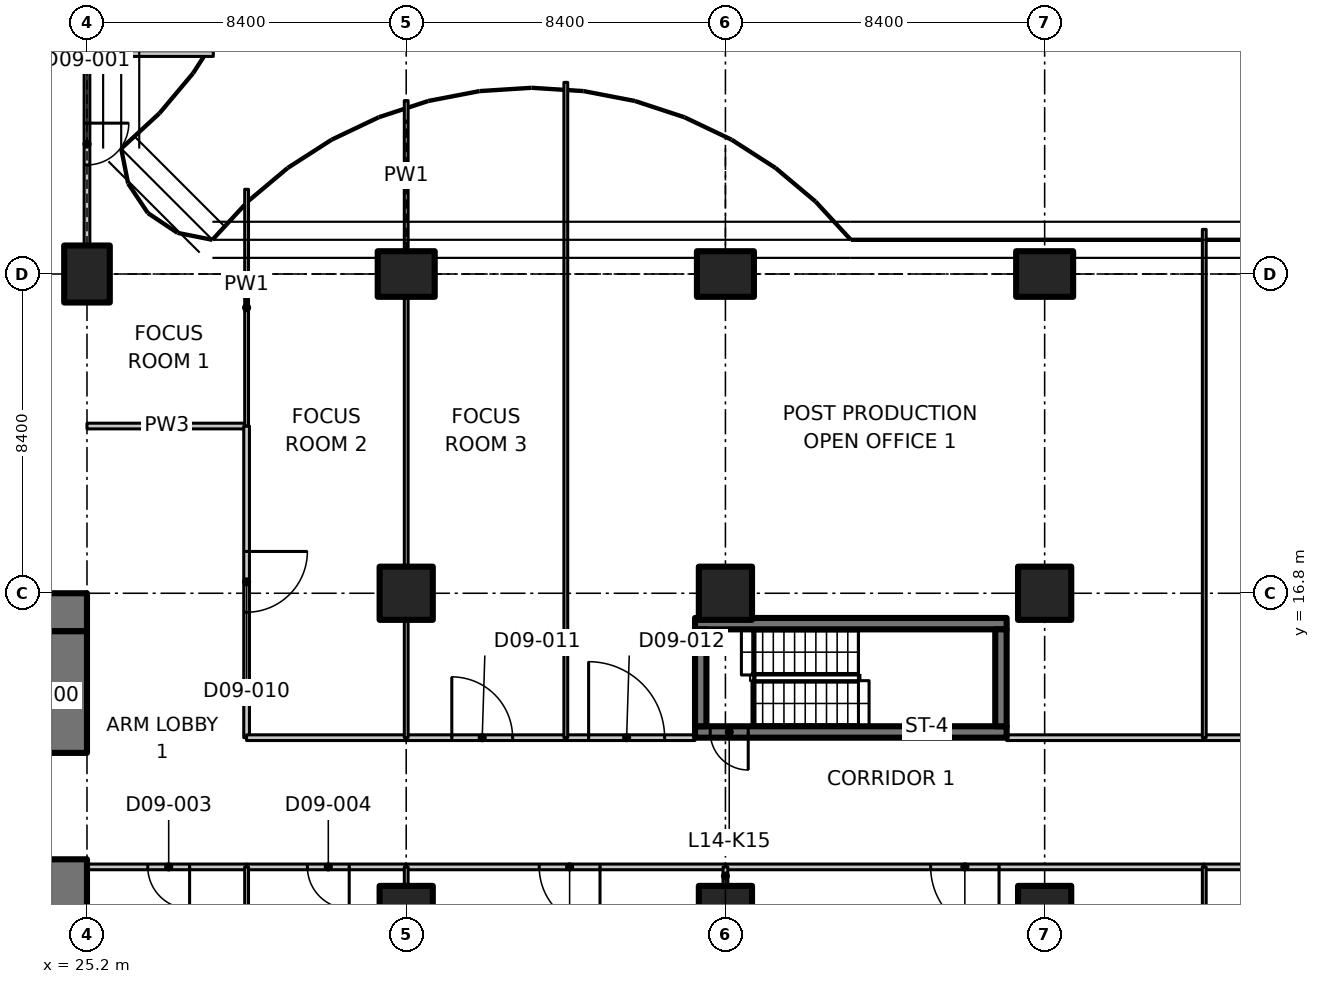
"""IFC4 building model, lengths in metres.
Left out: names, types, materials, properties, quantities, classifications, styles, units other than length and angle.
Written with IfcOpenShell. Run it as: python <this file> out.ifc"""

import sys

from ifc_helpers import new_model, si_unit, direction, frame, frame_2d, origin, origin_2d, place, context, subcontext, project, spatial, polyline, rectangle, outline, extrude, element, fill, save


model = new_model("IFC4")
c1 = context("Model", 3, precision=1e-05, world=origin(), true_north=direction((0.0, 1.0)))
c2 = subcontext(c1, "Body", "Model", "MODEL_VIEW")
j1 = project(units=[si_unit("LENGTHUNIT", "METRE"), si_unit("PLANEANGLEUNIT", "RADIAN")], contexts=[c1])
p1 = place(None, origin())
s1 = spatial("IfcSite", under=j1, at=p1, CompositionType="ELEMENT")
p2 = place(p1, origin())
s2 = spatial("IfcBuilding", under=s1, at=p2, CompositionType="ELEMENT")
p3 = place(p2, frame((0.0, 0.0, 65.3)))
s3 = spatial("IfcBuildingStorey", under=s2, at=p3, CompositionType="ELEMENT", Elevation=65.3)
p4 = place(p3, frame((25.2, 25.2, 0.0), z_axis=(0.0, 0.0, 1.0), x_axis=(1.0, 0.0, 0.0)))
e1 = element("IfcColumn", 1, at=p4, inside=s3, PredefinedType="COLUMN", context=c2, shape_type="SweptSolid", body=[
    extrude(rectangle(XDim=1.2, YDim=1.5, at=origin_2d()), origin(), (0.0, 0.0, 1.0), 3.35),
])
for number, where, z_axis, x_axis in (
    (2, (33.6, 8.4, 0.0), (0.0, 0.0, 1.0), (1.0, 0.0, 0.0)),
    (3, (33.6, 16.8, 0.0), (0.0, 0.0, 1.0), (1.0, 0.0, 0.0)),
):
    element("IfcColumn", number, at=place(p3, frame(where, z_axis=z_axis, x_axis=x_axis)), inside=s3, PredefinedType="COLUMN", context=c2, shape_type="SweptSolid", body=[
        extrude(rectangle(XDim=1.4, YDim=1.4, at=origin_2d()), origin(), (0.0, 0.0, 1.0), 3.35),
    ])
p5 = place(p3, frame((33.6, 25.2, 0.0), z_axis=(0.0, 0.0, 1.0), x_axis=(0.0, 1.0, 0.0)))
e4 = element("IfcColumn", 4, at=p5, inside=s3, PredefinedType="COLUMN", context=c2, shape_type="SweptSolid", body=[
    extrude(rectangle(XDim=1.2, YDim=1.5, at=origin_2d()), origin(), (0.0, 0.0, 1.0), 3.35),
])
for number, where, z_axis, x_axis in (
    (5, (42.0, 8.4, 0.0), (0.0, 0.0, 1.0), (1.0, 0.0, 0.0)),
    (6, (42.0, 16.8, 0.0), (0.0, 0.0, 1.0), (1.0, 0.0, 0.0)),
):
    element("IfcColumn", number, at=place(p3, frame(where, z_axis=z_axis, x_axis=x_axis)), inside=s3, PredefinedType="COLUMN", context=c2, shape_type="SweptSolid", body=[
        extrude(rectangle(XDim=1.4, YDim=1.4, at=origin_2d()), origin(), (0.0, 0.0, 1.0), 3.35),
    ])
p6 = place(p3, frame((42.0, 25.2, 0.0), z_axis=(0.0, 0.0, 1.0), x_axis=(0.0, 1.0, 0.0)))
e7 = element("IfcColumn", 7, at=p6, inside=s3, PredefinedType="COLUMN", context=c2, shape_type="SweptSolid", body=[
    extrude(rectangle(XDim=1.2, YDim=1.5, at=origin_2d()), origin(), (0.0, 0.0, 1.0), 3.35),
])
for number, where, z_axis, x_axis in (
    (8, (50.4, 8.4, 0.0), (0.0, 0.0, 1.0), (1.0, 0.0, 0.0)),
    (9, (50.4, 16.8, 0.0), (0.0, 0.0, 1.0), (1.0, 0.0, 0.0)),
):
    element("IfcColumn", number, at=place(p3, frame(where, z_axis=z_axis, x_axis=x_axis)), inside=s3, PredefinedType="COLUMN", context=c2, shape_type="SweptSolid", body=[
        extrude(rectangle(XDim=1.4, YDim=1.4, at=origin_2d()), origin(), (0.0, 0.0, 1.0), 3.35),
    ])
p7 = place(p3, frame((50.4, 25.2, 0.0), z_axis=(0.0, 0.0, 1.0), x_axis=(0.0, 1.0, 0.0)))
e10 = element("IfcColumn", 10, at=p7, inside=s3, PredefinedType="COLUMN", context=c2, shape_type="SweptSolid", body=[
    extrude(rectangle(XDim=1.2, YDim=1.5, at=origin_2d()), origin(), (0.0, 0.0, 1.0), 3.35),
])
p8 = place(p3, frame((23.8, 16.3, 0.0), z_axis=(0.0, 0.0, 1.0), x_axis=(1.0, 0.0, 0.0)))
e11 = element("IfcWall", 11, at=p8, inside=s3, PredefinedType="SHEAR", context=c2, shape_type="SweptSolid", body=[
    extrude(rectangle(XDim=1.4, YDim=1.0, at=frame_2d((0.7, 0.0))), origin(), (0.0, 0.0, 1.0), 3.35),
])
p9 = place(p3, frame((24.7, 1.0, 0.0), z_axis=(0.0, 0.0, 1.0), x_axis=(0.0, 1.0, 0.0)))
e12 = element("IfcWall", 12, at=p9, inside=s3, PredefinedType="SHEAR", context=c2, shape_type="SweptSolid", body=[
    extrude(rectangle(XDim=8.8, YDim=1.0, at=frame_2d((4.4, 0.0))), origin(), (0.0, 0.0, 1.0), 3.35),
])
p10 = place(p3, frame((24.7, 12.6, 0.0), z_axis=(0.0, 0.0, 1.0), x_axis=(0.0, 1.0, 0.0)))
e13 = element("IfcWall", 13, at=p10, inside=s3, PredefinedType="SHEAR", context=c2, shape_type="SweptSolid", body=[
    extrude(rectangle(XDim=3.2, YDim=1.0, at=frame_2d((1.6, 0.0))), origin(), (0.0, 0.0, 1.0), 3.35),
])
p11 = place(p3, frame((49.4, 13.15, 0.0), z_axis=(0.0, 0.0, 1.0), x_axis=(-1.0, 0.0, 0.0)))
e14 = element("IfcWall", 14, at=p11, inside=s3, PredefinedType="SHEAR", context=c2, shape_type="SweptSolid", body=[
    extrude(rectangle(XDim=8.2, YDim=0.3, at=frame_2d((4.1, 0.0))), origin(), (0.0, 0.0, 1.0), 3.35),
])
p12 = place(p11, frame((6.8, 0.0, 0.0)))
e15 = element("IfcOpeningElement", 15, at=p12, cuts=e14, PredefinedType="OPENING", context=c2, shape_type="SweptSolid", body=[
    extrude(rectangle(XDim=1.0, YDim=2.1, at=frame_2d((0.5, 1.05))), frame((0.0, 0.16, 0.0), z_axis=(0.0, -1.0, 0.0), x_axis=(1.0, 0.0, 0.0)), (0.0, 0.0, 1.0), 0.32),
])
p13 = place(p3, frame((41.2, 16.0, 0.0), z_axis=(0.0, 0.0, 1.0), x_axis=(1.0, 0.0, 0.0)))
e16 = element("IfcWall", 16, at=p13, inside=s3, PredefinedType="SHEAR", context=c2, shape_type="SweptSolid", body=[
    extrude(rectangle(XDim=8.2, YDim=0.3, at=frame_2d((4.1, 0.0))), origin(), (0.0, 0.0, 1.0), 3.35),
])
for number, where, z_axis, x_axis in (
    (17, (41.35, 13.3, 0.0), (0.0, 0.0, 1.0), (0.0, 1.0, 0.0)),
    (18, (49.25, 13.3, 0.0), (0.0, 0.0, 1.0), (0.0, 1.0, 0.0)),
):
    element("IfcWall", number, at=place(p3, frame(where, z_axis=z_axis, x_axis=x_axis)), inside=s3, PredefinedType="SHEAR", context=c2, shape_type="SweptSolid", body=[
        extrude(rectangle(XDim=2.55, YDim=0.3, at=frame_2d((1.275, 0.0))), origin(), (0.0, 0.0, 1.0), 3.35),
    ])
p14 = place(p3, frame((25.2, 21.2, 0.0), z_axis=(0.0, 0.0, 1.0), x_axis=(1.0, 0.0, 0.0)))
e19 = element("IfcWall", 19, at=p14, inside=s3, PredefinedType="PARTITIONING", context=c2, shape_type="SweptSolid", body=[
    extrude(rectangle(XDim=4.2, YDim=0.15, at=frame_2d((2.1, 0.0))), origin(), (0.0, 0.0, 1.0), 3.33),
])
p15 = place(p3, frame((29.4, 9.6, 0.0), z_axis=(0.0, 0.0, 1.0), x_axis=(-1.0, 0.0, 0.0)))
e20 = element("IfcWall", 20, at=p15, inside=s3, PredefinedType="PARTITIONING", context=c2, shape_type="SweptSolid", body=[
    extrude(rectangle(XDim=4.2, YDim=0.15, at=frame_2d((2.1, 0.0))), origin(), (0.0, 0.0, 1.0), 3.33),
])
p16 = place(p15, frame((1.5, 0.0, 0.0)))
e21 = element("IfcOpeningElement", 21, at=p16, cuts=e20, PredefinedType="OPENING", context=c2, shape_type="SweptSolid", body=[
    extrude(rectangle(XDim=1.1, YDim=2.1, at=frame_2d((0.55, 1.05))), frame((0.0, 0.085, 0.0), z_axis=(0.0, -1.0, 0.0), x_axis=(1.0, 0.0, 0.0)), (0.0, 0.0, 1.0), 0.17),
])
p17 = place(p3, frame((29.4, 21.2, 0.0), z_axis=(0.0, 0.0, 1.0), x_axis=(0.0, -1.0, 0.0)))
e22 = element("IfcWall", 22, at=p17, inside=s3, PredefinedType="PARTITIONING", context=c2, shape_type="SweptSolid", body=[
    extrude(rectangle(XDim=8.2, YDim=0.15, at=frame_2d((4.1, 0.0))), origin(), (0.0, 0.0, 1.0), 3.33),
])
p18 = place(p17, frame((3.3, 0.0, 0.0)))
e23 = element("IfcOpeningElement", 23, at=p18, cuts=e22, PredefinedType="OPENING", context=c2, shape_type="SweptSolid", body=[
    extrude(rectangle(XDim=1.6, YDim=2.1, at=frame_2d((0.8, 1.05))), frame((0.0, 0.085, 0.0), z_axis=(0.0, -1.0, 0.0), x_axis=(1.0, 0.0, 0.0)), (0.0, 0.0, 1.0), 0.17),
])
p19 = place(p3, frame((29.4, 27.429, 0.0), z_axis=(0.0, 0.0, 1.0), x_axis=(0.0, -1.0, 0.0)))
e24 = element("IfcWall", 24, at=p19, inside=s3, PredefinedType="PARTITIONING", context=c2, shape_type="SweptSolid", body=[
    extrude(outline(polyline([(0.0, 0.0), (6.229, 0.0), (6.229, 3.33), (2.679, 3.33), (2.677, 2.98), (1.781, 2.98), (1.779, 3.33), (0.154, 3.33), (0.0, 3.33), (0.0, 0.0)])), frame((0.0, 0.05, 0.0), z_axis=(0.0, -1.0, 0.0), x_axis=(1.0, 0.0, 0.0)), (0.0, 0.0, 1.0), 0.1),
])
p20 = place(p3, frame((25.2, 31.0, 0.0), z_axis=(0.0, 0.0, 1.0), x_axis=(0.0, -1.0, 0.0)))
e25 = element("IfcWall", 25, at=p20, inside=s3, PredefinedType="PARTITIONING", context=c2, shape_type="SweptSolid", body=[
    extrude(outline(polyline([(0.0, 0.0), (5.03, 0.0), (5.03, 2.98), (0.0, 2.98), (0.0, 0.0)])), frame((0.0, 0.075, 0.0), z_axis=(0.0, -1.0, 0.0), x_axis=(1.0, 0.0, 0.0)), (0.0, 0.0, 1.0), 0.15),
])
p21 = place(p20, frame((1.83, 0.0, 0.0)))
e26 = element("IfcOpeningElement", 26, at=p21, cuts=e25, PredefinedType="OPENING", context=c2, shape_type="SweptSolid", body=[
    extrude(rectangle(XDim=1.1, YDim=2.1, at=frame_2d((0.55, 1.05))), frame((0.0, 0.085, 0.0), z_axis=(0.0, -1.0, 0.0), x_axis=(1.0, 0.0, 0.0)), (0.0, 0.0, 1.0), 0.17),
])
p22 = place(p3, frame((25.2, 31.0, 0.0), z_axis=(0.0, 0.0, 1.0), x_axis=(1.0, 0.0, 0.0)))
e27 = element("IfcWall", 27, at=p22, inside=s3, PredefinedType="PARTITIONING", context=c2, shape_type="SweptSolid", body=[
    extrude(rectangle(XDim=3.324, YDim=0.15, at=frame_2d((1.662, 0.0))), origin(), (0.0, 0.0, 1.0), 2.98),
])
p23 = place(p3, frame((33.6, 9.6, 0.0), z_axis=(0.0, 0.0, 1.0), x_axis=(-1.0, 0.0, 0.0)))
e28 = element("IfcWall", 28, at=p23, inside=s3, PredefinedType="PARTITIONING", context=c2, shape_type="SweptSolid", body=[
    extrude(rectangle(XDim=4.2, YDim=0.15, at=frame_2d((2.1, 0.0))), origin(), (0.0, 0.0, 1.0), 3.33),
])
p24 = place(p23, frame((1.5, 0.0, 0.0)))
e29 = element("IfcOpeningElement", 29, at=p24, cuts=e28, PredefinedType="OPENING", context=c2, shape_type="SweptSolid", body=[
    extrude(rectangle(XDim=1.1, YDim=2.1, at=frame_2d((0.55, 1.05))), frame((0.0, 0.085, 0.0), z_axis=(0.0, -1.0, 0.0), x_axis=(1.0, 0.0, 0.0)), (0.0, 0.0, 1.0), 0.17),
])
p25 = place(p3, frame((42.0, 9.6, 0.0), z_axis=(0.0, 0.0, 1.0), x_axis=(-1.0, 0.0, 0.0)))
e30 = element("IfcWall", 30, at=p25, inside=s3, PredefinedType="PARTITIONING", context=c2, shape_type="SweptSolid", body=[
    extrude(rectangle(XDim=8.4, YDim=0.15, at=frame_2d((4.2, 0.0))), origin(), (0.0, 0.0, 1.0), 3.33),
])
p26 = place(p25, frame((3.3, 0.0, 0.0)))
e31 = element("IfcOpeningElement", 31, at=p26, cuts=e30, PredefinedType="OPENING", context=c2, shape_type="SweptSolid", body=[
    extrude(rectangle(XDim=1.6, YDim=2.1, at=frame_2d((0.8, 1.05))), frame((0.0, 0.085, 0.0), z_axis=(0.0, -1.0, 0.0), x_axis=(1.0, 0.0, 0.0)), (0.0, 0.0, 1.0), 0.17),
])
p27 = place(p3, frame((54.6, 9.6, 0.0), z_axis=(0.0, 0.0, 1.0), x_axis=(-1.0, 0.0, 0.0)))
e32 = element("IfcWall", 32, at=p27, inside=s3, PredefinedType="PARTITIONING", context=c2, shape_type="SweptSolid", body=[
    extrude(rectangle(XDim=12.6, YDim=0.15, at=frame_2d((6.3, 0.0))), origin(), (0.0, 0.0, 1.0), 3.33),
])
p28 = place(p27, frame((5.4, 0.0, 0.0)))
e33 = element("IfcOpeningElement", 33, at=p28, cuts=e32, PredefinedType="OPENING", context=c2, shape_type="SweptSolid", body=[
    extrude(rectangle(XDim=1.8, YDim=2.1, at=frame_2d((0.9, 1.05))), frame((0.0, 0.085, 0.0), z_axis=(0.0, -1.0, 0.0), x_axis=(1.0, 0.0, 0.0)), (0.0, 0.0, 1.0), 0.17),
])
p29 = place(p3, frame((58.8, 9.6, 0.0), z_axis=(0.0, 0.0, 1.0), x_axis=(-1.0, 0.0, 0.0)))
e34 = element("IfcWall", 34, at=p29, inside=s3, PredefinedType="PARTITIONING", context=c2, shape_type="SweptSolid", body=[
    extrude(rectangle(XDim=4.2, YDim=0.15, at=frame_2d((2.1, 0.0))), origin(), (0.0, 0.0, 1.0), 3.33),
])
p30 = place(p3, frame((29.4, 13.0, 0.0), z_axis=(0.0, 0.0, 1.0), x_axis=(1.0, 0.0, 0.0)))
e35 = element("IfcWall", 35, at=p30, inside=s3, PredefinedType="PARTITIONING", context=c2, shape_type="SweptSolid", body=[
    extrude(rectangle(XDim=4.2, YDim=0.15, at=frame_2d((2.1, 0.0))), origin(), (0.0, 0.0, 1.0), 3.33),
])
p31 = place(p3, frame((33.6, 13.0, 0.0), z_axis=(0.0, 0.0, 1.0), x_axis=(1.0, 0.0, 0.0)))
e36 = element("IfcWall", 36, at=p31, inside=s3, PredefinedType="PARTITIONING", context=c2, shape_type="SweptSolid", body=[
    extrude(rectangle(XDim=4.2, YDim=0.15, at=frame_2d((2.1, 0.0))), origin(), (0.0, 0.0, 1.0), 3.33),
])
p32 = place(p31, frame((1.2, 0.0, 0.0)))
e37 = element("IfcOpeningElement", 37, at=p32, cuts=e36, PredefinedType="OPENING", context=c2, shape_type="SweptSolid", body=[
    extrude(rectangle(XDim=1.6, YDim=2.1, at=frame_2d((0.8, 1.05))), frame((0.0, 0.085, 0.0), z_axis=(0.0, -1.0, 0.0), x_axis=(1.0, 0.0, 0.0)), (0.0, 0.0, 1.0), 0.17),
])
p33 = place(p3, frame((37.8, 13.0, 0.0), z_axis=(0.0, 0.0, 1.0), x_axis=(1.0, 0.0, 0.0)))
e38 = element("IfcWall", 38, at=p33, inside=s3, PredefinedType="PARTITIONING", context=c2, shape_type="SweptSolid", body=[
    extrude(rectangle(XDim=3.4, YDim=0.15, at=frame_2d((1.7, 0.0))), origin(), (0.0, 0.0, 1.0), 3.33),
])
p34 = place(p33, frame((0.6, 0.0, 0.0)))
e39 = element("IfcOpeningElement", 39, at=p34, cuts=e38, PredefinedType="OPENING", context=c2, shape_type="SweptSolid", body=[
    extrude(rectangle(XDim=2.0, YDim=2.4, at=frame_2d((1.0, 1.2))), frame((0.0, 0.085, 0.0), z_axis=(0.0, -1.0, 0.0), x_axis=(1.0, 0.0, 0.0)), (0.0, 0.0, 1.0), 0.17),
])
p35 = place(p3, frame((49.4, 13.0, 0.0), z_axis=(0.0, 0.0, 1.0), x_axis=(1.0, 0.0, 0.0)))
e40 = element("IfcWall", 40, at=p35, inside=s3, PredefinedType="PARTITIONING", context=c2, shape_type="SweptSolid", body=[
    extrude(rectangle(XDim=5.2, YDim=0.15, at=frame_2d((2.6, 0.0))), origin(), (0.0, 0.0, 1.0), 3.33),
])
p36 = place(p3, frame((54.6, 13.0, 0.0), z_axis=(0.0, 0.0, 1.0), x_axis=(1.0, 0.0, 0.0)))
e41 = element("IfcWall", 41, at=p36, inside=s3, PredefinedType="PARTITIONING", context=c2, shape_type="SweptSolid", body=[
    extrude(rectangle(XDim=8.4, YDim=0.15, at=frame_2d((4.2, 0.0))), origin(), (0.0, 0.0, 1.0), 3.33),
])
p37 = place(p36, frame((3.3, 0.0, 0.0)))
e42 = element("IfcOpeningElement", 42, at=p37, cuts=e41, PredefinedType="OPENING", context=c2, shape_type="SweptSolid", body=[
    extrude(rectangle(XDim=1.6, YDim=2.1, at=frame_2d((0.8, 1.05))), frame((0.0, 0.085, 0.0), z_axis=(0.0, -1.0, 0.0), x_axis=(1.0, 0.0, 0.0)), (0.0, 0.0, 1.0), 0.17),
])
p38 = place(p3, frame((29.4, 9.6, 0.0), z_axis=(0.0, 0.0, 1.0), x_axis=(0.0, -1.0, 0.0)))
e43 = element("IfcWall", 43, at=p38, inside=s3, PredefinedType="PARTITIONING", context=c2, shape_type="SweptSolid", body=[
    extrude(outline(polyline([(0.0, 0.0), (10.965, 0.0), (10.965, 3.33), (10.7, 3.33), (10.05, 3.33), (10.048, 2.98), (9.152, 2.98), (9.15, 3.33), (0.0, 3.33), (0.0, 0.0)])), frame((0.0, 0.05, 0.0), z_axis=(0.0, -1.0, 0.0), x_axis=(1.0, 0.0, 0.0)), (0.0, 0.0, 1.0), 0.1),
])
p39 = place(p3, frame((33.6, 9.6, 0.0), z_axis=(0.0, 0.0, 1.0), x_axis=(0.0, -1.0, 0.0)))
e44 = element("IfcWall", 44, at=p39, inside=s3, PredefinedType="PARTITIONING", context=c2, shape_type="SweptSolid", body=[
    extrude(rectangle(XDim=0.48, YDim=0.1, at=frame_2d((0.24, 0.0))), origin(), (0.0, 0.0, 1.0), 3.33),
])
p40 = place(p3, frame((42.0, 9.6, 0.0), z_axis=(0.0, 0.0, 1.0), x_axis=(0.0, -1.0, 0.0)))
e45 = element("IfcWall", 45, at=p40, inside=s3, PredefinedType="PARTITIONING", context=c2, shape_type="SweptSolid", body=[
    extrude(rectangle(XDim=0.48, YDim=0.125, at=frame_2d((0.24, 0.0))), origin(), (0.0, 0.0, 1.0), 3.33),
])
p41 = place(p3, frame((54.6, 9.6, 0.0), z_axis=(0.0, 0.0, 1.0), x_axis=(0.0, -1.0, 0.0)))
e46 = element("IfcWall", 46, at=p41, inside=s3, PredefinedType="PARTITIONING", context=c2, shape_type="SweptSolid", body=[
    extrude(rectangle(XDim=4.2, YDim=0.1, at=frame_2d((2.1, 0.0))), origin(), (0.0, 0.0, 1.0), 3.33),
])
p42 = place(p3, frame((33.6, 29.762, 0.0), z_axis=(0.0, 0.0, 1.0), x_axis=(0.0, -1.0, 0.0)))
e47 = element("IfcWall", 47, at=p42, inside=s3, PredefinedType="PARTITIONING", context=c2, shape_type="SweptSolid", body=[
    extrude(rectangle(XDim=3.942, YDim=0.1, at=frame_2d((1.971, 0.0))), origin(), (0.0, 0.0, 1.0), 2.98),
])
p43 = place(p3, frame((33.6, 24.58, 0.0), z_axis=(0.0, 0.0, 1.0), x_axis=(0.0, -1.0, 0.0)))
e48 = element("IfcWall", 48, at=p43, inside=s3, PredefinedType="PARTITIONING", context=c2, shape_type="SweptSolid", body=[
    extrude(rectangle(XDim=7.06, YDim=0.1, at=frame_2d((3.53, 0.0))), origin(), (0.0, 0.0, 1.0), 3.33),
])
p44 = place(p3, frame((33.6, 16.08, 0.0), z_axis=(0.0, 0.0, 1.0), x_axis=(0.0, -1.0, 0.0)))
e49 = element("IfcWall", 49, at=p44, inside=s3, PredefinedType="PARTITIONING", context=c2, shape_type="SweptSolid", body=[
    extrude(rectangle(XDim=3.08, YDim=0.1, at=frame_2d((1.54, 0.0))), origin(), (0.0, 0.0, 1.0), 3.33),
])
p45 = place(p3, frame((37.8, 30.243, 0.0), z_axis=(0.0, 0.0, 1.0), x_axis=(0.0, -1.0, 0.0)))
e50 = element("IfcWall", 50, at=p45, inside=s3, PredefinedType="PARTITIONING", context=c2, shape_type="SweptSolid", body=[
    extrude(outline(polyline([(0.0, 0.0), (17.243, 0.0), (17.243, 3.33), (5.493, 3.33), (5.491, 2.98), (4.595, 2.98), (4.593, 3.33), (0.0, 3.33), (0.0, 0.0)])), frame((0.0, 0.05, 0.0), z_axis=(0.0, -1.0, 0.0), x_axis=(1.0, 0.0, 0.0)), (0.0, 0.0, 1.0), 0.1),
])
p46 = place(p3, frame((54.6, 26.374, 0.0), z_axis=(0.0, 0.0, 1.0), x_axis=(0.0, -1.0, 0.0)))
e51 = element("IfcWall", 51, at=p46, inside=s3, PredefinedType="PARTITIONING", context=c2, shape_type="SweptSolid", body=[
    extrude(outline(polyline([(0.0, 0.0), (13.374, 0.0), (13.374, 3.33), (1.624, 3.33), (1.622, 2.98), (0.726, 2.98), (0.724, 3.33), (0.074, 3.33), (0.0, 3.33), (0.0, 0.0)])), frame((0.0, 0.05, 0.0), z_axis=(0.0, -1.0, 0.0), x_axis=(1.0, 0.0, 0.0)), (0.0, 0.0, 1.0), 0.1),
])
p47 = place(p12, origin())
e52 = element("IfcDoor", 52, at=p47, inside=s3, OperationType="SINGLE_SWING_RIGHT", PredefinedType="DOOR", context=c2, shape_type="SweptSolid", body=[
    extrude(rectangle(XDim=1.0, YDim=2.1, at=frame_2d((0.5, 1.05))), frame((0.0, 0.025, 0.0), z_axis=(0.0, -1.0, 0.0), x_axis=(1.0, 0.0, 0.0)), (0.0, 0.0, 1.0), 0.05),
])
fill(e15, e52)
p48 = place(p21, origin())
e53 = element("IfcDoor", 53, at=p48, inside=s3, OperationType="SINGLE_SWING_RIGHT", PredefinedType="DOOR", context=c2, shape_type="SweptSolid", body=[
    extrude(rectangle(XDim=1.1, YDim=2.1, at=frame_2d((0.55, 1.05))), frame((0.0, 0.025, 0.0), z_axis=(0.0, -1.0, 0.0), x_axis=(1.0, 0.0, 0.0)), (0.0, 0.0, 1.0), 0.05),
])
fill(e26, e53)
p49 = place(p16, origin())
e54 = element("IfcDoor", 54, at=p49, inside=s3, OperationType="SINGLE_SWING_LEFT", PredefinedType="DOOR", context=c2, shape_type="SweptSolid", body=[
    extrude(rectangle(XDim=1.1, YDim=2.1, at=frame_2d((0.55, 1.05))), frame((0.0, 0.025, 0.0), z_axis=(0.0, -1.0, 0.0), x_axis=(1.0, 0.0, 0.0)), (0.0, 0.0, 1.0), 0.05),
])
fill(e21, e54)
p50 = place(p24, origin())
e55 = element("IfcDoor", 55, at=p50, inside=s3, OperationType="SINGLE_SWING_LEFT", PredefinedType="DOOR", context=c2, shape_type="SweptSolid", body=[
    extrude(rectangle(XDim=1.1, YDim=2.1, at=frame_2d((0.55, 1.05))), frame((0.0, 0.025, 0.0), z_axis=(0.0, -1.0, 0.0), x_axis=(1.0, 0.0, 0.0)), (0.0, 0.0, 1.0), 0.05),
])
fill(e29, e55)
p51 = place(p26, origin())
e56 = element("IfcDoor", 56, at=p51, inside=s3, OperationType="DOUBLE_DOOR_SINGLE_SWING", PredefinedType="DOOR", context=c2, shape_type="SweptSolid", body=[
    extrude(rectangle(XDim=1.6, YDim=2.1, at=frame_2d((0.8, 1.05))), frame((0.0, 0.025, 0.0), z_axis=(0.0, -1.0, 0.0), x_axis=(1.0, 0.0, 0.0)), (0.0, 0.0, 1.0), 0.05),
])
fill(e31, e56)
p52 = place(p28, origin())
e57 = element("IfcDoor", 57, at=p52, inside=s3, OperationType="DOUBLE_DOOR_SINGLE_SWING", PredefinedType="DOOR", context=c2, shape_type="SweptSolid", body=[
    extrude(rectangle(XDim=1.8, YDim=2.1, at=frame_2d((0.9, 1.05))), frame((0.0, 0.025, 0.0), z_axis=(0.0, -1.0, 0.0), x_axis=(1.0, 0.0, 0.0)), (0.0, 0.0, 1.0), 0.05),
])
fill(e33, e57)
p53 = place(p18, origin())
e58 = element("IfcDoor", 58, at=p53, inside=s3, OperationType="DOUBLE_DOOR_SINGLE_SWING", PredefinedType="DOOR", context=c2, shape_type="SweptSolid", body=[
    extrude(rectangle(XDim=1.6, YDim=2.1, at=frame_2d((0.8, 1.05))), frame((0.0, 0.025, 0.0), z_axis=(0.0, -1.0, 0.0), x_axis=(1.0, 0.0, 0.0)), (0.0, 0.0, 1.0), 0.05),
])
fill(e23, e58)
p54 = place(p32, origin())
e59 = element("IfcDoor", 59, at=p54, inside=s3, OperationType="DOUBLE_DOOR_SINGLE_SWING", PredefinedType="DOOR", context=c2, shape_type="SweptSolid", body=[
    extrude(rectangle(XDim=1.6, YDim=2.1, at=frame_2d((0.8, 1.05))), frame((0.0, 0.025, 0.0), z_axis=(0.0, -1.0, 0.0), x_axis=(1.0, 0.0, 0.0)), (0.0, 0.0, 1.0), 0.05),
])
fill(e37, e59)
p55 = place(p34, origin())
e60 = element("IfcDoor", 60, at=p55, inside=s3, OperationType="DOUBLE_DOOR_SINGLE_SWING", PredefinedType="DOOR", context=c2, shape_type="SweptSolid", body=[
    extrude(rectangle(XDim=2.0, YDim=2.4, at=frame_2d((1.0, 1.2))), frame((0.0, 0.025, 0.0), z_axis=(0.0, -1.0, 0.0), x_axis=(1.0, 0.0, 0.0)), (0.0, 0.0, 1.0), 0.05),
])
fill(e39, e60)
save(model, sys.argv[1])
